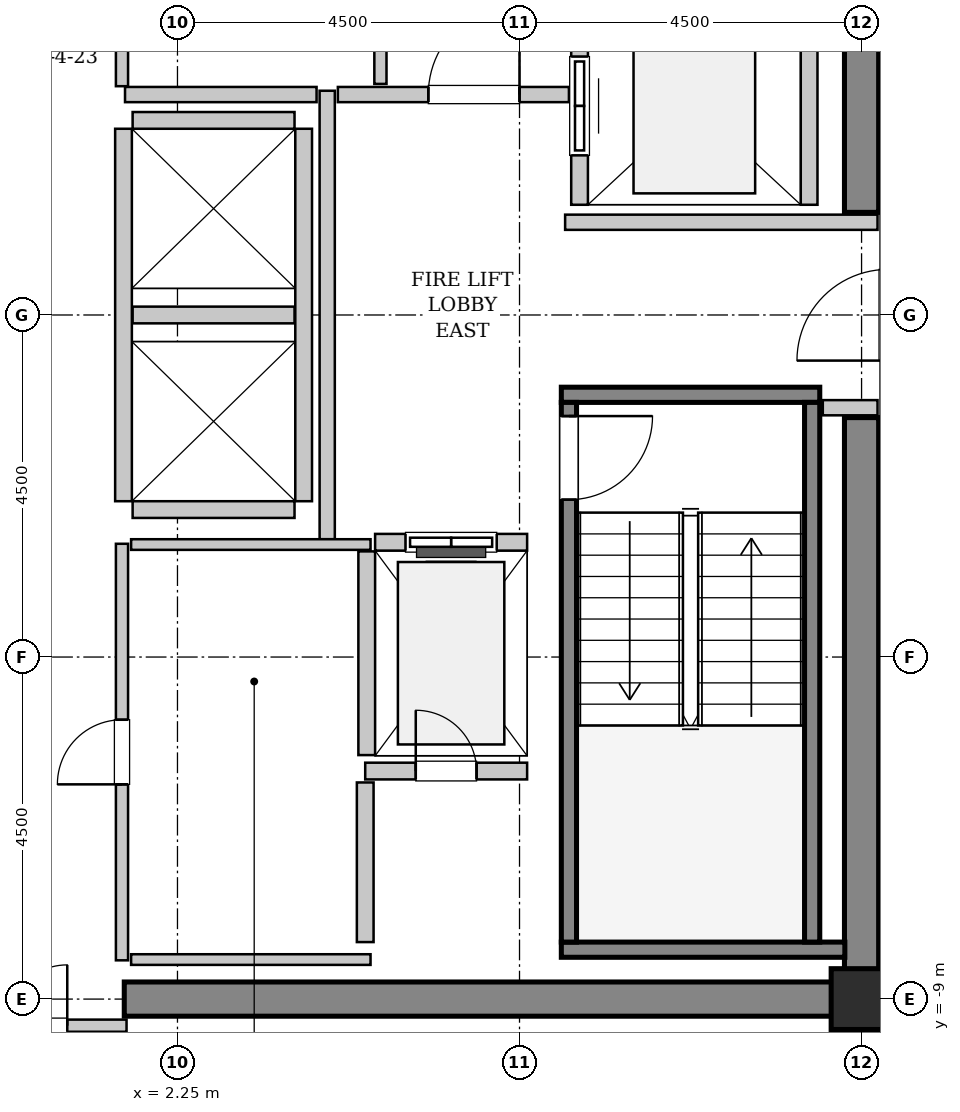
"""IFC4 building model, lengths in metres.
Left out: names, types, materials, properties, quantities, classifications, styles, units other than length and angle.
Written with IfcOpenShell. Run it as: python <this file> out.ifc"""

import sys

from ifc_helpers import new_model, si_unit, direction, frame, frame_2d, origin, origin_2d, place, context, subcontext, project, spatial, rectangle, hollow_rectangle, extrude, source, transform, mapped, element, fill, save


model = new_model("IFC4")
c1 = context("Model", 3, precision=1e-05, world=origin(), true_north=direction((0.0, 1.0)))
c2 = subcontext(c1, "Body", "Model", "MODEL_VIEW")
j1 = project(units=[si_unit("LENGTHUNIT", "METRE"), si_unit("PLANEANGLEUNIT", "RADIAN")], contexts=[c1])
p1 = place(None, origin())
s1 = spatial("IfcSite", under=j1, at=p1, CompositionType="ELEMENT")
p2 = place(p1, origin())
s2 = spatial("IfcBuilding", under=s1, at=p2, CompositionType="ELEMENT")
p3 = place(p2, frame((0.0, 0.0, 272.2)))
s3 = spatial("IfcBuildingStorey", under=s2, at=p3, CompositionType="ELEMENT", Elevation=272.2)
m1 = source(origin(), c2, "Body", "SweptSolid", [
    extrude(rectangle(XDim=9.925, YDim=0.45, at=frame_2d((4.962, 0.0))), origin(), (0.0, 0.0, 1.0), 3.8),
])
p4 = place(p3, frame((1.55, -9.0, 0.0), z_axis=(0.0, 0.0, 1.0), x_axis=(1.0, 0.0, 0.0)))
e1 = element("IfcWall", 1, at=p4, inside=s3, PredefinedType="SHEAR", context=c2, shape_type="MappedRepresentation", body=[
    mapped(m1, transform((0.0, 0.0, 0.0), x_axis=(1.0, 0.0, 0.0), y_axis=(0.0, 1.0, 0.0), z_axis=(0.0, 0.0, 1.0), scale=1.0)),
])
m2 = source(origin(), c2, "Body", "SweptSolid", [
    extrude(rectangle(XDim=7.425, YDim=0.45, at=frame_2d((3.712, 0.0))), origin(), (0.0, 0.0, 1.0), 3.8),
])
for number, where, z_axis, x_axis in (
    (2, (11.25, -8.775, 0.0), (0.0, 0.0, 1.0), (0.0, 1.0, 0.0)),
    (3, (11.25, 1.35, 0.0), (0.0, 0.0, 1.0), (0.0, 1.0, 0.0)),
):
    element("IfcWall", number, at=place(p3, frame(where, z_axis=z_axis, x_axis=x_axis)), inside=s3, PredefinedType="SHEAR", context=c2, shape_type="MappedRepresentation", body=[
        mapped(m2, transform((0.0, 0.0, 0.0), x_axis=(1.0, 0.0, 0.0), y_axis=(0.0, 1.0, 0.0), z_axis=(0.0, 0.0, 1.0), scale=1.0)),
    ])
m3 = source(origin(), c2, "Body", "SweptSolid", [
    extrude(hollow_rectangle(XDim=0.8, YDim=0.8, WallThickness=0.04, InnerFilletRadius=0.04, OuterFilletRadius=0.08, at=origin_2d()), origin(), (0.0, 0.0, 1.0), 3.8),
])
p5 = place(p3, frame((11.25, -9.0, 0.0), z_axis=(0.0, 0.0, 1.0), x_axis=(1.0, 0.0, 0.0)))
e4 = element("IfcColumn", 4, at=p5, inside=s3, PredefinedType="COLUMN", context=c2, shape_type="MappedRepresentation", body=[
    mapped(m3, transform((0.0, 0.0, 0.0), x_axis=(1.0, 0.0, 0.0), y_axis=(0.0, 1.0, 0.0), z_axis=(0.0, 0.0, 1.0), scale=1.0)),
])
m4 = source(origin(), c2, "Body", "SweptSolid", [
    extrude(rectangle(XDim=3.4, YDim=0.2, at=frame_2d((1.7, 0.0))), origin(), (0.0, 0.0, 1.0), 3.8),
])
p6 = place(p3, frame((7.3, -1.05, 0.0), z_axis=(0.0, 0.0, 1.0), x_axis=(1.0, 0.0, 0.0)))
e5 = element("IfcWall", 5, at=p6, inside=s3, PredefinedType="SOLIDWALL", context=c2, shape_type="MappedRepresentation", body=[
    mapped(m4, transform((0.0, 0.0, 0.0), x_axis=(1.0, 0.0, 0.0), y_axis=(0.0, 1.0, 0.0), z_axis=(0.0, 0.0, 1.0), scale=1.0)),
])
m5 = source(origin(), c2, "Body", "SweptSolid", [
    extrude(rectangle(XDim=3.73, YDim=0.2, at=frame_2d((1.865, 0.0))), origin(), (0.0, 0.0, 1.0), 3.8),
])
p7 = place(p3, frame((7.3, -8.35, 0.0), z_axis=(0.0, 0.0, 1.0), x_axis=(1.0, 0.0, 0.0)))
e6 = element("IfcWall", 6, at=p7, inside=s3, PredefinedType="SOLIDWALL", context=c2, shape_type="MappedRepresentation", body=[
    mapped(m5, transform((0.0, 0.0, 0.0), x_axis=(1.0, 0.0, 0.0), y_axis=(0.0, 1.0, 0.0), z_axis=(0.0, 0.0, 1.0), scale=1.0)),
])
m6 = source(origin(), c2, "Body", "SweptSolid", [
    extrude(rectangle(XDim=7.1, YDim=0.2, at=frame_2d((3.55, 0.0))), origin(), (0.0, 0.0, 1.0), 3.8),
])
p8 = place(p3, frame((7.4, -1.15, 0.0), z_axis=(0.0, 0.0, 1.0), x_axis=(0.0, -1.0, 0.0)))
e7 = element("IfcWall", 7, at=p8, inside=s3, PredefinedType="SOLIDWALL", context=c2, shape_type="MappedRepresentation", body=[
    mapped(m6, transform((0.0, 0.0, 0.0), x_axis=(1.0, 0.0, 0.0), y_axis=(0.0, 1.0, 0.0), z_axis=(0.0, 0.0, 1.0), scale=1.0)),
])
p9 = place(p8, frame((0.18, 0.0, 0.0)))
e8 = element("IfcOpeningElement", 8, at=p9, cuts=e7, PredefinedType="OPENING", context=c2, shape_type="SweptSolid", body=[
    extrude(rectangle(XDim=1.1, YDim=2.15, at=frame_2d((0.55, 1.075))), frame((0.0, 0.11, 0.0), z_axis=(0.0, -1.0, 0.0), x_axis=(1.0, 0.0, 0.0)), (0.0, 0.0, 1.0), 0.22),
])
p10 = place(p3, frame((10.6, -1.15, 0.0), z_axis=(0.0, 0.0, 1.0), x_axis=(0.0, -1.0, 0.0)))
e9 = element("IfcWall", 9, at=p10, inside=s3, PredefinedType="SOLIDWALL", context=c2, shape_type="MappedRepresentation", body=[
    mapped(m6, transform((0.0, 0.0, 0.0), x_axis=(1.0, 0.0, 0.0), y_axis=(0.0, 1.0, 0.0), z_axis=(0.0, 0.0, 1.0), scale=1.0)),
])
m7 = source(origin(), c2, "Body", "SweptSolid", [
    extrude(rectangle(XDim=2.0, YDim=0.22, at=frame_2d((1.0, 0.0))), origin(), (0.0, 0.0, 1.0), 3.535),
])
p11 = place(p3, frame((6.85, -2.99, 0.0), z_axis=(0.0, 0.0, 1.0), x_axis=(-1.0, 0.0, 0.0)))
e10 = element("IfcWall", 10, at=p11, inside=s3, PredefinedType="SOLIDWALL", context=c2, shape_type="MappedRepresentation", body=[
    mapped(m7, transform((0.0, 0.0, 0.0), x_axis=(1.0, 0.0, 0.0), y_axis=(0.0, 1.0, 0.0), z_axis=(0.0, 0.0, 1.0), scale=1.0)),
])
p12 = place(p11, frame((0.4, 0.0, 0.0)))
e11 = element("IfcOpeningElement", 11, at=p12, cuts=e10, PredefinedType="OPENING", context=c2, shape_type="SweptSolid", body=[
    extrude(rectangle(XDim=1.2, YDim=2.2, at=frame_2d((0.6, 1.1))), frame((0.0, 0.12, 0.0), z_axis=(0.0, -1.0, 0.0), x_axis=(1.0, 0.0, 0.0)), (0.0, 0.0, 1.0), 0.24),
])
m8 = source(origin(), c2, "Body", "SweptSolid", [
    extrude(rectangle(XDim=2.68, YDim=0.22, at=frame_2d((1.34, 0.0))), origin(), (0.0, 0.0, 1.0), 3.535),
])
p13 = place(p3, frame((4.74, -3.11, 0.0), z_axis=(0.0, 0.0, 1.0), x_axis=(0.0, -1.0, 0.0)))
e12 = element("IfcWall", 12, at=p13, inside=s3, PredefinedType="SOLIDWALL", context=c2, shape_type="MappedRepresentation", body=[
    mapped(m8, transform((0.0, 0.0, 0.0), x_axis=(1.0, 0.0, 0.0), y_axis=(0.0, 1.0, 0.0), z_axis=(0.0, 0.0, 1.0), scale=1.0)),
])
m9 = source(origin(), c2, "Body", "SweptSolid", [
    extrude(rectangle(XDim=5.45, YDim=0.22, at=frame_2d((2.725, 0.0))), origin(), (0.0, 0.0, 1.0), 3.535),
])
p14 = place(p3, frame((7.54, 6.9, 0.0), z_axis=(0.0, 0.0, 1.0), x_axis=(0.0, -1.0, 0.0)))
e13 = element("IfcWall", 13, at=p14, inside=s3, PredefinedType="SOLIDWALL", context=c2, shape_type="MappedRepresentation", body=[
    mapped(m9, transform((0.0, 0.0, 0.0), x_axis=(1.0, 0.0, 0.0), y_axis=(0.0, 1.0, 0.0), z_axis=(0.0, 0.0, 1.0), scale=1.0)),
])
p15 = place(p14, frame((3.5, 0.0, 0.0)))
e14 = element("IfcOpeningElement", 14, at=p15, cuts=e13, PredefinedType="OPENING", context=c2, shape_type="SweptSolid", body=[
    extrude(rectangle(XDim=1.3, YDim=2.3, at=frame_2d((0.65, 1.15))), frame((0.0, 0.12, 0.0), z_axis=(0.0, -1.0, 0.0), x_axis=(1.0, 0.0, 0.0)), (0.0, 0.0, 1.0), 0.24),
])
p16 = place(p14, frame((0.65, 0.0, 0.0)))
e15 = element("IfcOpeningElement", 15, at=p16, cuts=e13, PredefinedType="OPENING", context=c2, shape_type="SweptSolid", body=[
    extrude(rectangle(XDim=1.3, YDim=2.3, at=frame_2d((0.65, 1.15))), frame((0.0, 0.12, 0.0), z_axis=(0.0, -1.0, 0.0), x_axis=(1.0, 0.0, 0.0)), (0.0, 0.0, 1.0), 0.24),
])
p17 = place(p3, frame((10.56, 1.45, 0.0), z_axis=(0.0, 0.0, 1.0), x_axis=(0.0, 1.0, 0.0)))
e16 = element("IfcWall", 16, at=p17, inside=s3, PredefinedType="SOLIDWALL", context=c2, shape_type="MappedRepresentation", body=[
    mapped(m9, transform((0.0, 0.0, 0.0), x_axis=(1.0, 0.0, 0.0), y_axis=(0.0, 1.0, 0.0), z_axis=(0.0, 0.0, 1.0), scale=1.0)),
])
m10 = source(origin(), c2, "Body", "SweptSolid", [
    extrude(rectangle(XDim=4.9, YDim=0.22, at=frame_2d((2.45, 0.0))), origin(), (0.0, 0.0, 1.0), 3.535),
])
for number, where, z_axis, x_axis in (
    (17, (1.54, 2.45, 0.0), (0.0, 0.0, 1.0), (0.0, -1.0, 0.0)),
    (18, (3.91, -2.45, 0.0), (0.0, 0.0, 1.0), (0.0, 1.0, 0.0)),
):
    element("IfcWall", number, at=place(p3, frame(where, z_axis=z_axis, x_axis=x_axis)), inside=s3, PredefinedType="SOLIDWALL", context=c2, shape_type="MappedRepresentation", body=[
        mapped(m10, transform((0.0, 0.0, 0.0), x_axis=(1.0, 0.0, 0.0), y_axis=(0.0, 1.0, 0.0), z_axis=(0.0, 0.0, 1.0), scale=1.0)),
    ])
m11 = source(origin(), c2, "Body", "SweptSolid", [
    extrude(rectangle(XDim=2.13, YDim=0.22, at=frame_2d((1.065, 0.0))), origin(), (0.0, 0.0, 1.0), 3.535),
])
for number, where, z_axis, x_axis in (
    (19, (1.66, -2.56, 0.0), (0.0, 0.0, 1.0), (1.0, 0.0, 0.0)),
    (20, (1.66, 0.0, 0.0), (0.0, 0.0, 1.0), (1.0, 0.0, 0.0)),
    (21, (3.79, 2.56, 0.0), (0.0, 0.0, 1.0), (-1.0, 0.0, 0.0)),
):
    element("IfcWall", number, at=place(p3, frame(where, z_axis=z_axis, x_axis=x_axis)), inside=s3, PredefinedType="SOLIDWALL", context=c2, shape_type="MappedRepresentation", body=[
        mapped(m11, transform((0.0, 0.0, 0.0), x_axis=(1.0, 0.0, 0.0), y_axis=(0.0, 1.0, 0.0), z_axis=(0.0, 0.0, 1.0), scale=1.0)),
    ])
p18 = place(p3, frame((4.72, -6.0, 0.0), z_axis=(0.0, 0.0, 1.0), x_axis=(1.0, 0.0, 0.0)))
e22 = element("IfcWall", 22, at=p18, inside=s3, PredefinedType="SOLIDWALL", context=c2, shape_type="MappedRepresentation", body=[
    mapped(m11, transform((0.0, 0.0, 0.0), x_axis=(1.0, 0.0, 0.0), y_axis=(0.0, 1.0, 0.0), z_axis=(0.0, 0.0, 1.0), scale=1.0)),
])
p19 = place(p18, frame((0.665, 0.0, 0.0)))
e23 = element("IfcOpeningElement", 23, at=p19, cuts=e22, PredefinedType="OPENING", context=c2, shape_type="SweptSolid", body=[
    extrude(rectangle(XDim=0.8, YDim=2.0, at=frame_2d((0.4, 1.0))), frame((0.0, 0.12, 0.0), z_axis=(0.0, -1.0, 0.0), x_axis=(1.0, 0.0, 0.0)), (0.0, 0.0, 1.0), 0.24),
])
m12 = source(origin(), c2, "Body", "SweptSolid", [
    extrude(rectangle(XDim=2.1, YDim=0.22, at=frame_2d((1.05, 0.0))), origin(), (0.0, 0.0, 1.0), 3.535),
])
p20 = place(p3, frame((4.72, -8.25, 0.0), z_axis=(0.0, 0.0, 1.0), x_axis=(0.0, 1.0, 0.0)))
e24 = element("IfcWall", 24, at=p20, inside=s3, PredefinedType="SOLIDWALL", context=c2, shape_type="MappedRepresentation", body=[
    mapped(m12, transform((0.0, 0.0, 0.0), x_axis=(1.0, 0.0, 0.0), y_axis=(0.0, 1.0, 0.0), z_axis=(0.0, 0.0, 1.0), scale=1.0)),
])
m13 = source(origin(), c2, "Body", "SweptSolid", [
    extrude(rectangle(XDim=5.9, YDim=0.2, at=frame_2d((2.95, 0.0))), origin(), (0.0, 0.0, 1.0), 3.535),
])
p21 = place(p3, frame((4.22, -2.95, 0.0), z_axis=(0.0, 0.0, 1.0), x_axis=(0.0, 1.0, 0.0)))
e25 = element("IfcWall", 25, at=p21, inside=s3, PredefinedType="PARTITIONING", context=c2, shape_type="MappedRepresentation", body=[
    mapped(m13, transform((0.0, 0.0, 0.0), x_axis=(1.0, 0.0, 0.0), y_axis=(0.0, 1.0, 0.0), z_axis=(0.0, 0.0, 1.0), scale=1.0)),
])
m14 = source(origin(), c2, "Body", "SweptSolid", [
    extrude(rectangle(XDim=2.52, YDim=0.2, at=frame_2d((1.26, 0.0))), origin(), (0.0, 0.0, 1.0), 3.535),
])
p22 = place(p3, frame((1.56, 2.9, 0.0), z_axis=(0.0, 0.0, 1.0), x_axis=(1.0, 0.0, 0.0)))
e26 = element("IfcWall", 26, at=p22, inside=s3, PredefinedType="PARTITIONING", context=c2, shape_type="MappedRepresentation", body=[
    mapped(m14, transform((0.0, 0.0, 0.0), x_axis=(1.0, 0.0, 0.0), y_axis=(0.0, 1.0, 0.0), z_axis=(0.0, 0.0, 1.0), scale=1.0)),
])
m15 = source(origin(), c2, "Body", "SweptSolid", [
    extrude(rectangle(XDim=3.04, YDim=0.2, at=frame_2d((1.52, 0.0))), origin(), (0.0, 0.0, 1.0), 3.535),
])
p23 = place(p3, frame((4.36, 2.9, 0.0), z_axis=(0.0, 0.0, 1.0), x_axis=(1.0, 0.0, 0.0)))
e27 = element("IfcWall", 27, at=p23, inside=s3, PredefinedType="PARTITIONING", context=c2, shape_type="MappedRepresentation", body=[
    mapped(m15, transform((0.0, 0.0, 0.0), x_axis=(1.0, 0.0, 0.0), y_axis=(0.0, 1.0, 0.0), z_axis=(0.0, 0.0, 1.0), scale=1.0)),
])
p24 = place(p23, frame((1.19, 0.0, 0.0)))
e28 = element("IfcOpeningElement", 28, at=p24, cuts=e27, PredefinedType="OPENING", context=c2, shape_type="SweptSolid", body=[
    extrude(rectangle(XDim=1.2, YDim=2.15, at=frame_2d((0.6, 1.075))), frame((0.0, 0.11, 0.0), z_axis=(0.0, -1.0, 0.0), x_axis=(1.0, 0.0, 0.0)), (0.0, 0.0, 1.0), 0.22),
])
m16 = source(origin(), c2, "Body", "SweptSolid", [
    extrude(rectangle(XDim=4.11, YDim=0.2, at=frame_2d((2.055, 0.0))), origin(), (0.0, 0.0, 1.0), 3.535),
])
p25 = place(p3, frame((7.35, 1.22, 0.0), z_axis=(0.0, 0.0, 1.0), x_axis=(1.0, 0.0, 0.0)))
e29 = element("IfcWall", 29, at=p25, inside=s3, PredefinedType="PARTITIONING", context=c2, shape_type="MappedRepresentation", body=[
    mapped(m16, transform((0.0, 0.0, 0.0), x_axis=(1.0, 0.0, 0.0), y_axis=(0.0, 1.0, 0.0), z_axis=(0.0, 0.0, 1.0), scale=1.0)),
])
m17 = source(origin(), c2, "Body", "SweptSolid", [
    extrude(rectangle(XDim=0.72, YDim=0.2, at=frame_2d((0.36, 0.0))), origin(), (0.0, 0.0, 1.0), 3.535),
])
p26 = place(p3, frame((10.74, -1.22, 0.0), z_axis=(0.0, 0.0, 1.0), x_axis=(1.0, 0.0, 0.0)))
e30 = element("IfcWall", 30, at=p26, inside=s3, PredefinedType="PARTITIONING", context=c2, shape_type="MappedRepresentation", body=[
    mapped(m17, transform((0.0, 0.0, 0.0), x_axis=(1.0, 0.0, 0.0), y_axis=(0.0, 1.0, 0.0), z_axis=(0.0, 0.0, 1.0), scale=1.0)),
])
m18 = source(origin(), c2, "Body", "SweptSolid", [
    extrude(rectangle(XDim=3.16, YDim=0.16, at=frame_2d((1.58, 0.0))), origin(), (0.0, 0.0, 1.0), 2.625),
])
p27 = place(p3, frame((-1.58, -9.35, 0.0), z_axis=(0.0, 0.0, 1.0), x_axis=(1.0, 0.0, 0.0)))
e31 = element("IfcWall", 31, at=p27, inside=s3, PredefinedType="PARTITIONING", context=c2, shape_type="MappedRepresentation", body=[
    mapped(m18, transform((0.0, 0.0, 0.0), x_axis=(1.0, 0.0, 0.0), y_axis=(0.0, 1.0, 0.0), z_axis=(0.0, 0.0, 1.0), scale=1.0)),
])
p28 = place(p27, frame((0.78, 0.0, 0.0)))
e32 = element("IfcOpeningElement", 32, at=p28, cuts=e31, PredefinedType="OPENING", context=c2, shape_type="SweptSolid", body=[
    extrude(rectangle(XDim=1.6, YDim=2.3, at=frame_2d((0.8, 1.15))), frame((0.0, 0.09, 0.0), z_axis=(0.0, -1.0, 0.0), x_axis=(1.0, 0.0, 0.0)), (0.0, 0.0, 1.0), 0.18),
])
m19 = source(origin(), c2, "Body", "SweptSolid", [
    extrude(rectangle(XDim=5.45, YDim=0.16, at=frame_2d((2.725, 0.0))), origin(), (0.0, 0.0, 1.0), 3.535),
])
p29 = place(p3, frame((4.92, 3.04, 0.0), z_axis=(0.0, 0.0, 1.0), x_axis=(0.0, 1.0, 0.0)))
e33 = element("IfcWall", 33, at=p29, inside=s3, PredefinedType="PARTITIONING", context=c2, shape_type="MappedRepresentation", body=[
    mapped(m19, transform((0.0, 0.0, 0.0), x_axis=(1.0, 0.0, 0.0), y_axis=(0.0, 1.0, 0.0), z_axis=(0.0, 0.0, 1.0), scale=1.0)),
])
m20 = source(origin(), c2, "Body", "SweptSolid", [
    extrude(rectangle(XDim=5.48, YDim=0.16, at=frame_2d((2.74, 0.0))), origin(), (0.0, 0.0, 1.0), 3.535),
])
p30 = place(p3, frame((1.52, 3.01, 0.0), z_axis=(0.0, 0.0, 1.0), x_axis=(0.0, 1.0, 0.0)))
e34 = element("IfcWall", 34, at=p30, inside=s3, PredefinedType="PARTITIONING", context=c2, shape_type="MappedRepresentation", body=[
    mapped(m20, transform((0.0, 0.0, 0.0), x_axis=(1.0, 0.0, 0.0), y_axis=(0.0, 1.0, 0.0), z_axis=(0.0, 0.0, 1.0), scale=1.0)),
])
p31 = place(p30, frame((2.315, 0.0, 0.0)))
e35 = element("IfcOpeningElement", 35, at=p31, cuts=e34, PredefinedType="OPENING", context=c2, shape_type="SweptSolid", body=[
    extrude(rectangle(XDim=0.85, YDim=2.1, at=frame_2d((0.425, 1.05))), frame((0.0, 0.09, 0.0), z_axis=(0.0, -1.0, 0.0), x_axis=(1.0, 0.0, 0.0)), (0.0, 0.0, 1.0), 0.18),
])
p32 = place(p3, frame((1.52, -8.49, 0.0), z_axis=(0.0, 0.0, 1.0), x_axis=(0.0, 1.0, 0.0)))
e36 = element("IfcWall", 36, at=p32, inside=s3, PredefinedType="PARTITIONING", context=c2, shape_type="MappedRepresentation", body=[
    mapped(m20, transform((0.0, 0.0, 0.0), x_axis=(1.0, 0.0, 0.0), y_axis=(0.0, 1.0, 0.0), z_axis=(0.0, 0.0, 1.0), scale=1.0)),
])
p33 = place(p32, frame((2.315, 0.0, 0.0)))
e37 = element("IfcOpeningElement", 37, at=p33, cuts=e36, PredefinedType="OPENING", context=c2, shape_type="SweptSolid", body=[
    extrude(rectangle(XDim=0.85, YDim=2.1, at=frame_2d((0.425, 1.05))), frame((0.0, 0.09, 0.0), z_axis=(0.0, -1.0, 0.0), x_axis=(1.0, 0.0, 0.0)), (0.0, 0.0, 1.0), 0.18),
])
m21 = source(origin(), c2, "Body", "SweptSolid", [
    extrude(rectangle(XDim=3.15, YDim=0.14, at=frame_2d((1.575, 0.0))), origin(), (0.0, 0.0, 1.0), 3.535),
])
for number, where, z_axis, x_axis in (
    (38, (1.64, -3.02, 0.0), (0.0, 0.0, 1.0), (1.0, 0.0, 0.0)),
    (39, (1.64, -8.48, 0.0), (0.0, 0.0, 1.0), (1.0, 0.0, 0.0)),
):
    element("IfcWall", number, at=place(p3, frame(where, z_axis=z_axis, x_axis=x_axis)), inside=s3, PredefinedType="PARTITIONING", context=c2, shape_type="MappedRepresentation", body=[
        mapped(m21, transform((0.0, 0.0, 0.0), x_axis=(1.0, 0.0, 0.0), y_axis=(0.0, 1.0, 0.0), z_axis=(0.0, 0.0, 1.0), scale=1.0)),
    ])
m22 = source(origin(), c2, "Body", "SweptSolid", [
    extrude(rectangle(XDim=1.1, YDim=2.15, at=frame_2d((0.55, 1.075))), frame((0.0, 0.025, 0.0), z_axis=(0.0, -1.0, 0.0), x_axis=(1.0, 0.0, 0.0)), (0.0, 0.0, 1.0), 0.05),
])
p34 = place(p9, origin())
e40 = element("IfcDoor", 40, at=p34, inside=s3, OperationType="SINGLE_SWING_LEFT", PredefinedType="DOOR", context=c2, shape_type="MappedRepresentation", body=[
    mapped(m22, transform((0.0, 0.0, 0.0), x_axis=(1.0, 0.0, 0.0), y_axis=(0.0, 1.0, 0.0), z_axis=(0.0, 0.0, 1.0), scale=1.0)),
])
fill(e8, e40)
m23 = source(origin(), c2, "Body", "SweptSolid", [
    extrude(rectangle(XDim=1.2, YDim=2.2, at=frame_2d((0.6, 1.1))), frame((0.0, 0.025, 0.0), z_axis=(0.0, -1.0, 0.0), x_axis=(1.0, 0.0, 0.0)), (0.0, 0.0, 1.0), 0.05),
])
p35 = place(p12, origin())
e41 = element("IfcDoor", 41, at=p35, inside=s3, OperationType="SLIDING_TO_LEFT", PredefinedType="DOOR", context=c2, shape_type="MappedRepresentation", body=[
    mapped(m23, transform((0.0, 0.0, 0.0), x_axis=(1.0, 0.0, 0.0), y_axis=(0.0, 1.0, 0.0), z_axis=(0.0, 0.0, 1.0), scale=1.0)),
])
fill(e11, e41)
m24 = source(origin(), c2, "Body", "SweptSolid", [
    extrude(rectangle(XDim=1.3, YDim=2.3, at=frame_2d((0.65, 1.15))), frame((0.0, 0.025, 0.0), z_axis=(0.0, -1.0, 0.0), x_axis=(1.0, 0.0, 0.0)), (0.0, 0.0, 1.0), 0.05),
])
p36 = place(p15, origin())
e42 = element("IfcDoor", 42, at=p36, inside=s3, OperationType="SLIDING_TO_RIGHT", PredefinedType="DOOR", context=c2, shape_type="MappedRepresentation", body=[
    mapped(m24, transform((0.0, 0.0, 0.0), x_axis=(1.0, 0.0, 0.0), y_axis=(0.0, 1.0, 0.0), z_axis=(0.0, 0.0, 1.0), scale=1.0)),
])
fill(e14, e42)
m25 = source(origin(), c2, "Body", "SweptSolid", [
    extrude(rectangle(XDim=0.8, YDim=2.0, at=frame_2d((0.4, 1.0))), frame((0.0, 0.025, 0.0), z_axis=(0.0, -1.0, 0.0), x_axis=(1.0, 0.0, 0.0)), (0.0, 0.0, 1.0), 0.05),
])
p37 = place(p19, origin())
e43 = element("IfcDoor", 43, at=p37, inside=s3, OperationType="SINGLE_SWING_LEFT", PredefinedType="TRAPDOOR", context=c2, shape_type="MappedRepresentation", body=[
    mapped(m25, transform((0.0, 0.0, 0.0), x_axis=(1.0, 0.0, 0.0), y_axis=(0.0, 1.0, 0.0), z_axis=(0.0, 0.0, 1.0), scale=1.0)),
])
fill(e23, e43)
m26 = source(origin(), c2, "Body", "SweptSolid", [
    extrude(rectangle(XDim=1.2, YDim=2.15, at=frame_2d((0.6, 1.075))), frame((0.0, 0.025, 0.0), z_axis=(0.0, -1.0, 0.0), x_axis=(1.0, 0.0, 0.0)), (0.0, 0.0, 1.0), 0.05),
])
p38 = place(p24, origin())
e44 = element("IfcDoor", 44, at=p38, inside=s3, OperationType="SINGLE_SWING_RIGHT", PredefinedType="DOOR", context=c2, shape_type="MappedRepresentation", body=[
    mapped(m26, transform((0.0, 0.0, 0.0), x_axis=(1.0, 0.0, 0.0), y_axis=(0.0, 1.0, 0.0), z_axis=(0.0, 0.0, 1.0), scale=1.0)),
])
fill(e28, e44)
m27 = source(origin(), c2, "Body", "SweptSolid", [
    extrude(rectangle(XDim=1.6, YDim=2.3, at=frame_2d((0.8, 1.15))), frame((0.0, 0.025, 0.0), z_axis=(0.0, -1.0, 0.0), x_axis=(1.0, 0.0, 0.0)), (0.0, 0.0, 1.0), 0.05),
])
p39 = place(p28, origin())
e45 = element("IfcDoor", 45, at=p39, inside=s3, OperationType="DOUBLE_DOOR_SINGLE_SWING", PredefinedType="DOOR", context=c2, shape_type="MappedRepresentation", body=[
    mapped(m27, transform((0.0, 0.0, 0.0), x_axis=(1.0, 0.0, 0.0), y_axis=(0.0, 1.0, 0.0), z_axis=(0.0, 0.0, 1.0), scale=1.0)),
])
fill(e32, e45)
m28 = source(origin(), c2, "Body", "SweptSolid", [
    extrude(rectangle(XDim=0.85, YDim=2.1, at=frame_2d((0.425, 1.05))), frame((0.0, 0.025, 0.0), z_axis=(0.0, -1.0, 0.0), x_axis=(1.0, 0.0, 0.0)), (0.0, 0.0, 1.0), 0.05),
])
p40 = place(p33, origin())
e46 = element("IfcDoor", 46, at=p40, inside=s3, OperationType="SINGLE_SWING_LEFT", PredefinedType="DOOR", context=c2, shape_type="MappedRepresentation", body=[
    mapped(m28, transform((0.0, 0.0, 0.0), x_axis=(1.0, 0.0, 0.0), y_axis=(0.0, 1.0, 0.0), z_axis=(0.0, 0.0, 1.0), scale=1.0)),
])
fill(e37, e46)
save(model, sys.argv[1])
